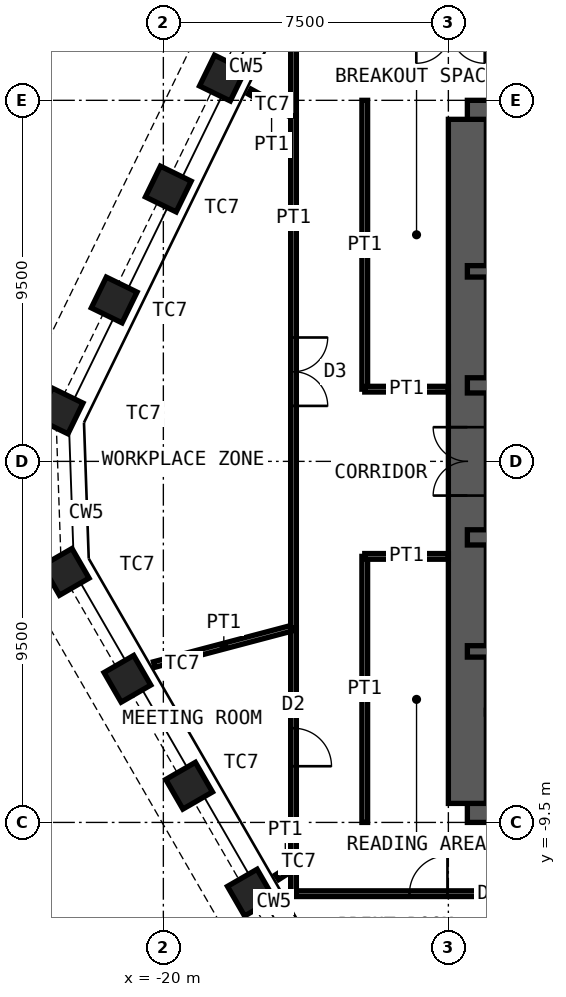
"""IFC4 building model, lengths in metres.
Left out: names, types, materials, properties, quantities, classifications, styles, units other than length and angle.
Written with IfcOpenShell. Run it as: python <this file> out.ifc"""

import sys

from ifc_helpers import new_model, si_unit, direction, frame, frame_2d, origin, origin_2d, place, context, subcontext, project, spatial, rectangle, hollow_rectangle, extrude, element, fill, save


model = new_model("IFC4")
c1 = context("Model", 3, precision=1e-05, world=origin(), true_north=direction((0.0, 1.0)))
c2 = subcontext(c1, "Body", "Model", "MODEL_VIEW")
j1 = project(units=[si_unit("LENGTHUNIT", "METRE"), si_unit("PLANEANGLEUNIT", "RADIAN")], contexts=[c1])
p1 = place(None, origin())
s1 = spatial("IfcSite", under=j1, at=p1, CompositionType="ELEMENT")
p2 = place(p1, origin())
s2 = spatial("IfcBuilding", under=s1, at=p2, CompositionType="ELEMENT")
p3 = place(p2, frame((0.0, 0.0, 299.8)))
s3 = spatial("IfcBuildingStorey", under=s2, at=p3, CompositionType="ELEMENT", Elevation=299.8)
for number, where, z_axis, x_axis in (
    (1, (-17.698, -11.347, 0.0), (0.0, 0.0, 1.0), (0.5, -0.866, 0.0)),
    (2, (-19.322, -8.534, 0.0), (0.0, 0.0, 1.0), (0.5, -0.866, 0.0)),
    (3, (-20.946, -5.721, 0.0), (0.0, 0.0, 1.0), (0.5, -0.866, 0.0)),
    (4, (-22.57, -2.908, 0.0), (0.0, 0.0, 1.0), (0.5, -0.866, 0.0)),
    (5, (-22.717, 1.327, 0.0), (0.0, 0.0, 1.0), (-0.438, -0.899, 0.0)),
    (6, (-21.293, 4.246, 0.0), (0.0, 0.0, 1.0), (-0.438, -0.899, 0.0)),
    (7, (-19.87, 7.166, 0.0), (0.0, 0.0, 1.0), (-0.438, -0.899, 0.0)),
    (8, (-18.446, 10.085, 0.0), (0.0, 0.0, 1.0), (-0.438, -0.899, 0.0)),
):
    element("IfcColumn", number, at=place(p3, frame(where, z_axis=z_axis, x_axis=x_axis)), inside=s3, PredefinedType="COLUMN", context=c2, shape_type="SweptSolid", body=[
        extrude(hollow_rectangle(XDim=0.9, YDim=0.9, WallThickness=0.06, at=origin_2d()), origin(), (0.0, 0.0, 1.0), 4.2),
    ])
p4 = place(p3, frame((-12.0, 9.0, 0.0), z_axis=(0.0, 0.0, 1.0), x_axis=(1.0, 0.0, 0.0)))
e9 = element("IfcWall", 9, at=p4, inside=s3, PredefinedType="SHEAR", context=c2, shape_type="SweptSolid", body=[
    extrude(rectangle(XDim=24.0, YDim=1.0, at=frame_2d((12.0, 0.0))), origin(), (0.0, 0.0, 1.0), 4.2),
])
p5 = place(p4, frame((10.4, 0.0, 0.0)))
e10 = element("IfcOpeningElement", 10, at=p5, cuts=e9, PredefinedType="OPENING", context=c2, shape_type="SweptSolid", body=[
    extrude(rectangle(XDim=1.0, YDim=2.1, at=frame_2d((0.5, 1.05))), frame((0.0, 0.51, 0.0), z_axis=(0.0, -1.0, 0.0), x_axis=(1.0, 0.0, 0.0)), (0.0, 0.0, 1.0), 1.02),
])
p6 = place(p4, frame((17.6, 0.0, 0.0)))
e11 = element("IfcOpeningElement", 11, at=p6, cuts=e9, PredefinedType="OPENING", context=c2, shape_type="SweptSolid", body=[
    extrude(rectangle(XDim=0.9, YDim=2.1, at=frame_2d((0.45, 1.05))), frame((0.0, 0.51, 0.0), z_axis=(0.0, -1.0, 0.0), x_axis=(1.0, 0.0, 0.0)), (0.0, 0.0, 1.0), 1.02),
])
p7 = place(p4, frame((21.9, 0.0, 0.0)))
e12 = element("IfcOpeningElement", 12, at=p7, cuts=e9, PredefinedType="OPENING", context=c2, shape_type="SweptSolid", body=[
    extrude(rectangle(XDim=0.9, YDim=2.1, at=frame_2d((0.45, 1.05))), frame((0.0, 0.51, 0.0), z_axis=(0.0, -1.0, 0.0), x_axis=(1.0, 0.0, 0.0)), (0.0, 0.0, 1.0), 1.02),
])
p8 = place(p3, frame((-12.0, -9.0, 0.0), z_axis=(0.0, 0.0, 1.0), x_axis=(1.0, 0.0, 0.0)))
e13 = element("IfcWall", 13, at=p8, inside=s3, PredefinedType="SHEAR", context=c2, shape_type="SweptSolid", body=[
    extrude(rectangle(XDim=24.0, YDim=1.0, at=frame_2d((12.0, 0.0))), origin(), (0.0, 0.0, 1.0), 4.2),
])
p9 = place(p8, frame((1.35, 0.0, 0.0)))
e14 = element("IfcOpeningElement", 14, at=p9, cuts=e13, PredefinedType="OPENING", context=c2, shape_type="SweptSolid", body=[
    extrude(rectangle(XDim=1.0, YDim=2.1, at=frame_2d((0.5, 1.05))), frame((0.0, 0.51, 0.0), z_axis=(0.0, -1.0, 0.0), x_axis=(1.0, 0.0, 0.0)), (0.0, 0.0, 1.0), 1.02),
])
p10 = place(p8, frame((5.325, 0.0, 0.0)))
e15 = element("IfcOpeningElement", 15, at=p10, cuts=e13, PredefinedType="OPENING", context=c2, shape_type="SweptSolid", body=[
    extrude(rectangle(XDim=1.15, YDim=2.1, at=frame_2d((0.575, 1.05))), frame((0.0, 0.51, 0.0), z_axis=(0.0, -1.0, 0.0), x_axis=(1.0, 0.0, 0.0)), (0.0, 0.0, 1.0), 1.02),
])
p11 = place(p8, frame((12.6, 0.0, 0.0)))
e16 = element("IfcOpeningElement", 16, at=p11, cuts=e13, PredefinedType="OPENING", context=c2, shape_type="SweptSolid", body=[
    extrude(rectangle(XDim=1.0, YDim=2.1, at=frame_2d((0.5, 1.05))), frame((0.0, 0.51, 0.0), z_axis=(0.0, -1.0, 0.0), x_axis=(1.0, 0.0, 0.0)), (0.0, 0.0, 1.0), 1.02),
])
p12 = place(p3, frame((-12.0, -9.0, 0.0), z_axis=(0.0, 0.0, 1.0), x_axis=(0.0, 1.0, 0.0)))
e17 = element("IfcWall", 17, at=p12, inside=s3, PredefinedType="SHEAR", context=c2, shape_type="SweptSolid", body=[
    extrude(rectangle(XDim=18.0, YDim=1.0, at=frame_2d((9.0, 0.0))), origin(), (0.0, 0.0, 1.0), 4.2),
])
p13 = place(p12, frame((8.1, 0.0, 0.0)))
e18 = element("IfcOpeningElement", 18, at=p13, cuts=e17, PredefinedType="OPENING", context=c2, shape_type="SweptSolid", body=[
    extrude(rectangle(XDim=1.8, YDim=2.1, at=frame_2d((0.9, 1.05))), frame((0.0, 0.51, 0.0), z_axis=(0.0, -1.0, 0.0), x_axis=(1.0, 0.0, 0.0)), (0.0, 0.0, 1.0), 1.02),
])
p14 = place(p3, frame((-12.0, 5.0, 0.0), z_axis=(0.0, 0.0, 1.0), x_axis=(1.0, 0.0, 0.0)))
e19 = element("IfcWall", 19, at=p14, inside=s3, PredefinedType="SHEAR", context=c2, shape_type="SweptSolid", body=[
    extrude(rectangle(XDim=24.0, YDim=0.3, at=frame_2d((12.0, 0.0))), origin(), (0.0, 0.0, 1.0), 4.2),
])
p15 = place(p3, frame((-12.0, 2.0, 0.0), z_axis=(0.0, 0.0, 1.0), x_axis=(1.0, 0.0, 0.0)))
e20 = element("IfcWall", 20, at=p15, inside=s3, PredefinedType="SHEAR", context=c2, shape_type="SweptSolid", body=[
    extrude(rectangle(XDim=24.0, YDim=0.4, at=frame_2d((12.0, 0.0))), origin(), (0.0, 0.0, 1.0), 4.2),
])
p16 = place(p15, frame((2.4, 0.0, 0.0)))
e21 = element("IfcOpeningElement", 21, at=p16, cuts=e20, PredefinedType="OPENING", context=c2, shape_type="SweptSolid", body=[
    extrude(rectangle(XDim=1.1, YDim=2.1, at=frame_2d((0.55, 1.05))), frame((0.0, 0.21, 0.0), z_axis=(0.0, -1.0, 0.0), x_axis=(1.0, 0.0, 0.0)), (0.0, 0.0, 1.0), 0.42),
])
p17 = place(p15, frame((22.0, 0.0, 0.0)))
e22 = element("IfcOpeningElement", 22, at=p17, cuts=e20, PredefinedType="OPENING", context=c2, shape_type="SweptSolid", body=[
    extrude(rectangle(XDim=1.1, YDim=2.1, at=frame_2d((0.55, 1.05))), frame((0.0, 0.21, 0.0), z_axis=(0.0, -1.0, 0.0), x_axis=(1.0, 0.0, 0.0)), (0.0, 0.0, 1.0), 0.42),
])
p18 = place(p15, frame((10.15, 0.0, 0.0)))
e23 = element("IfcOpeningElement", 23, at=p18, cuts=e20, PredefinedType="OPENING", context=c2, shape_type="SweptSolid", body=[
    extrude(rectangle(XDim=1.0, YDim=2.1, at=frame_2d((0.5, 1.05))), frame((0.0, 0.21, 0.0), z_axis=(0.0, -1.0, 0.0), x_axis=(1.0, 0.0, 0.0)), (0.0, 0.0, 1.0), 0.42),
])
p19 = place(p15, frame((6.9, 0.0, 0.0)))
e24 = element("IfcOpeningElement", 24, at=p19, cuts=e20, PredefinedType="OPENING", context=c2, shape_type="SweptSolid", body=[
    extrude(rectangle(XDim=1.0, YDim=2.1, at=frame_2d((0.5, 1.05))), frame((0.0, 0.21, 0.0), z_axis=(0.0, -1.0, 0.0), x_axis=(1.0, 0.0, 0.0)), (0.0, 0.0, 1.0), 0.42),
])
p20 = place(p15, frame((13.35, 0.0, 0.0)))
e25 = element("IfcOpeningElement", 25, at=p20, cuts=e20, PredefinedType="OPENING", context=c2, shape_type="SweptSolid", body=[
    extrude(rectangle(XDim=1.1, YDim=2.4, at=frame_2d((0.55, 1.2))), frame((0.0, 0.21, 0.0), z_axis=(0.0, -1.0, 0.0), x_axis=(1.0, 0.0, 0.0)), (0.0, 0.0, 1.0), 0.42),
])
p21 = place(p15, frame((16.15, 0.0, 0.0)))
e26 = element("IfcOpeningElement", 26, at=p21, cuts=e20, PredefinedType="OPENING", context=c2, shape_type="SweptSolid", body=[
    extrude(rectangle(XDim=1.1, YDim=2.4, at=frame_2d((0.55, 1.2))), frame((0.0, 0.21, 0.0), z_axis=(0.0, -1.0, 0.0), x_axis=(1.0, 0.0, 0.0)), (0.0, 0.0, 1.0), 0.42),
])
p22 = place(p15, frame((19.0, 0.0, 0.0)))
e27 = element("IfcOpeningElement", 27, at=p22, cuts=e20, PredefinedType="OPENING", context=c2, shape_type="SweptSolid", body=[
    extrude(rectangle(XDim=1.0, YDim=2.1, at=frame_2d((0.5, 1.05))), frame((0.0, 0.21, 0.0), z_axis=(0.0, -1.0, 0.0), x_axis=(1.0, 0.0, 0.0)), (0.0, 0.0, 1.0), 0.42),
])
p23 = place(p3, frame((-12.0, -2.0, 0.0), z_axis=(0.0, 0.0, 1.0), x_axis=(1.0, 0.0, 0.0)))
e28 = element("IfcWall", 28, at=p23, inside=s3, PredefinedType="SHEAR", context=c2, shape_type="SweptSolid", body=[
    extrude(rectangle(XDim=24.0, YDim=0.4, at=frame_2d((12.0, 0.0))), origin(), (0.0, 0.0, 1.0), 4.2),
])
p24 = place(p23, frame((1.1, 0.0, 0.0)))
e29 = element("IfcOpeningElement", 29, at=p24, cuts=e28, PredefinedType="OPENING", context=c2, shape_type="SweptSolid", body=[
    extrude(rectangle(XDim=1.1, YDim=2.1, at=frame_2d((0.55, 1.05))), frame((0.0, 0.21, 0.0), z_axis=(0.0, -1.0, 0.0), x_axis=(1.0, 0.0, 0.0)), (0.0, 0.0, 1.0), 0.42),
])
p25 = place(p23, frame((13.55, 0.0, 0.0)))
e30 = element("IfcOpeningElement", 30, at=p25, cuts=e28, PredefinedType="OPENING", context=c2, shape_type="SweptSolid", body=[
    extrude(rectangle(XDim=1.1, YDim=2.1, at=frame_2d((0.55, 1.05))), frame((0.0, 0.21, 0.0), z_axis=(0.0, -1.0, 0.0), x_axis=(1.0, 0.0, 0.0)), (0.0, 0.0, 1.0), 0.42),
])
p26 = place(p23, frame((20.7, 0.0, 0.0)))
e31 = element("IfcOpeningElement", 31, at=p26, cuts=e28, PredefinedType="OPENING", context=c2, shape_type="SweptSolid", body=[
    extrude(rectangle(XDim=1.1, YDim=2.1, at=frame_2d((0.55, 1.05))), frame((0.0, 0.21, 0.0), z_axis=(0.0, -1.0, 0.0), x_axis=(1.0, 0.0, 0.0)), (0.0, 0.0, 1.0), 0.42),
])
p27 = place(p23, frame((4.0, 0.0, 0.0)))
e32 = element("IfcOpeningElement", 32, at=p27, cuts=e28, PredefinedType="OPENING", context=c2, shape_type="SweptSolid", body=[
    extrude(rectangle(XDim=1.0, YDim=2.1, at=frame_2d((0.5, 1.05))), frame((0.0, 0.21, 0.0), z_axis=(0.0, -1.0, 0.0), x_axis=(1.0, 0.0, 0.0)), (0.0, 0.0, 1.0), 0.42),
])
p28 = place(p23, frame((6.8, 0.0, 0.0)))
e33 = element("IfcOpeningElement", 33, at=p28, cuts=e28, PredefinedType="OPENING", context=c2, shape_type="SweptSolid", body=[
    extrude(rectangle(XDim=1.0, YDim=2.1, at=frame_2d((0.5, 1.05))), frame((0.0, 0.21, 0.0), z_axis=(0.0, -1.0, 0.0), x_axis=(1.0, 0.0, 0.0)), (0.0, 0.0, 1.0), 0.42),
])
p29 = place(p23, frame((9.6, 0.0, 0.0)))
e34 = element("IfcOpeningElement", 34, at=p29, cuts=e28, PredefinedType="OPENING", context=c2, shape_type="SweptSolid", body=[
    extrude(rectangle(XDim=1.0, YDim=2.1, at=frame_2d((0.5, 1.05))), frame((0.0, 0.21, 0.0), z_axis=(0.0, -1.0, 0.0), x_axis=(1.0, 0.0, 0.0)), (0.0, 0.0, 1.0), 0.42),
])
p30 = place(p3, frame((-12.0, -5.0, 0.0), z_axis=(0.0, 0.0, 1.0), x_axis=(1.0, 0.0, 0.0)))
e35 = element("IfcWall", 35, at=p30, inside=s3, PredefinedType="SHEAR", context=c2, shape_type="SweptSolid", body=[
    extrude(rectangle(XDim=24.0, YDim=0.3, at=frame_2d((12.0, 0.0))), origin(), (0.0, 0.0, 1.0), 4.2),
])
p31 = place(p3, frame((-17.729, 9.73, 0.0), z_axis=(0.0, 0.0, 1.0), x_axis=(0.87667364743, -0.481085559855, 0.0)))
e36 = element("IfcWall", 36, at=p31, inside=s3, PredefinedType="PARTITIONING", context=c2, shape_type="SweptSolid", body=[
    extrude(rectangle(XDim=1.316, YDim=0.15, at=frame_2d((0.658, 0.0))), origin(), (0.0, 0.0, 1.0), 2.93),
])
p32 = place(p3, frame((-16.575, 9.097, 0.0), z_axis=(0.0, 0.0, 1.0), x_axis=(0.0, 1.0, 0.0)))
e37 = element("IfcWall", 37, at=p32, inside=s3, PredefinedType="PARTITIONING", context=c2, shape_type="SweptSolid", body=[
    extrude(rectangle(XDim=2.278, YDim=0.15, at=frame_2d((1.139, 0.0))), origin(), (0.0, 0.0, 1.0), 4.03),
])
p33 = place(p3, frame((-13.779, -16.546, 0.0), z_axis=(0.0, 0.0, 1.0), x_axis=(0.63993100432, 0.768432371592, 0.0)))
e38 = element("IfcWall", 38, at=p33, inside=s3, PredefinedType="PARTITIONING", context=c2, shape_type="SweptSolid", body=[
    extrude(rectangle(XDim=6.729, YDim=0.15, at=frame_2d((3.365, 0.0))), origin(), (0.0, 0.0, 1.0), 2.93),
])
p34 = place(p3, frame((-9.473, -11.375, 0.0), z_axis=(0.0, 0.0, 1.0), x_axis=(-1.0, 0.0, 0.0)))
e39 = element("IfcWall", 39, at=p34, inside=s3, PredefinedType="PARTITIONING", context=c2, shape_type="SweptSolid", body=[
    extrude(rectangle(XDim=7.102, YDim=0.15, at=frame_2d((3.551, 0.0))), origin(), (0.0, 0.0, 1.0), 4.03),
])
p35 = place(p34, frame((3.051, 0.0, 0.0)))
e40 = element("IfcOpeningElement", 40, at=p35, cuts=e39, PredefinedType="OPENING", context=c2, shape_type="SweptSolid", body=[
    extrude(rectangle(XDim=1.0, YDim=2.4, at=frame_2d((0.5, 1.2))), frame((0.0, 0.085, 0.0), z_axis=(0.0, -1.0, 0.0), x_axis=(1.0, 0.0, 0.0)), (0.0, 0.0, 1.0), 0.17),
])
p36 = place(p3, frame((-16.575, -11.375, 0.0), z_axis=(0.0, 0.0, 1.0), x_axis=(0.0, 1.0, 0.0)))
e41 = element("IfcWall", 41, at=p36, inside=s3, PredefinedType="PARTITIONING", context=c2, shape_type="SweptSolid", body=[
    extrude(rectangle(XDim=0.71, YDim=0.15, at=frame_2d((0.355, 0.0))), origin(), (0.0, 0.0, 1.0), 4.03),
])
p37 = place(p3, frame((-17.007, -10.943, 0.0), z_axis=(0.0, 0.0, 1.0), x_axis=(0.840931402951, 0.541141733311, 0.0)))
e42 = element("IfcWall", 42, at=p37, inside=s3, PredefinedType="PARTITIONING", context=c2, shape_type="SweptSolid", body=[
    extrude(rectangle(XDim=0.514, YDim=0.15, at=frame_2d((0.257, 0.0))), origin(), (0.0, 0.0, 1.0), 2.93),
])
p38 = place(p3, frame((-16.575, -10.665, 0.0), z_axis=(0.0, 0.0, 1.0), x_axis=(0.0, 1.0, 0.0)))
e43 = element("IfcWall", 43, at=p38, inside=s3, PredefinedType="PARTITIONING", context=c2, shape_type="SweptSolid", body=[
    extrude(rectangle(XDim=6.288, YDim=0.15, at=frame_2d((3.144, 0.0))), origin(), (0.0, 0.0, 1.0), 4.03),
])
p39 = place(p38, frame((2.644, 0.0, 0.0)))
e44 = element("IfcOpeningElement", 44, at=p39, cuts=e43, PredefinedType="OPENING", context=c2, shape_type="SweptSolid", body=[
    extrude(rectangle(XDim=1.0, YDim=2.4, at=frame_2d((0.5, 1.2))), frame((0.0, 0.085, 0.0), z_axis=(0.0, -1.0, 0.0), x_axis=(1.0, 0.0, 0.0)), (0.0, 0.0, 1.0), 0.17),
])
p40 = place(p3, frame((-20.243, -5.346, 0.0), z_axis=(0.0, 0.0, 1.0), x_axis=(0.966843218991, 0.255370691137, 0.0)))
e45 = element("IfcWall", 45, at=p40, inside=s3, PredefinedType="PARTITIONING", context=c2, shape_type="SweptSolid", body=[
    extrude(rectangle(XDim=3.793, YDim=0.15, at=frame_2d((1.897, 0.0))), origin(), (0.0, 0.0, 1.0), 2.93),
])
p41 = place(p3, frame((-16.575, -4.377, 0.0), z_axis=(0.0, 0.0, 1.0), x_axis=(0.0, 1.0, 0.0)))
e46 = element("IfcWall", 46, at=p41, inside=s3, PredefinedType="PARTITIONING", context=c2, shape_type="SweptSolid", body=[
    extrude(rectangle(XDim=13.474, YDim=0.15, at=frame_2d((6.737, 0.0))), origin(), (0.0, 0.0, 1.0), 4.03),
])
p42 = place(p41, frame((5.837, 0.0, 0.0)))
e47 = element("IfcOpeningElement", 47, at=p42, cuts=e46, PredefinedType="OPENING", context=c2, shape_type="SweptSolid", body=[
    extrude(rectangle(XDim=1.8, YDim=2.4, at=frame_2d((0.9, 1.2))), frame((0.0, 0.085, 0.0), z_axis=(0.0, -1.0, 0.0), x_axis=(1.0, 0.0, 0.0)), (0.0, 0.0, 1.0), 0.17),
])
p43 = place(p3, frame((-14.7, 1.9, 0.0), z_axis=(0.0, 0.0, 1.0), x_axis=(0.0, 1.0, 0.0)))
e48 = element("IfcWall", 48, at=p43, inside=s3, PredefinedType="PARTITIONING", context=c2, shape_type="SweptSolid", body=[
    extrude(rectangle(XDim=7.6, YDim=0.15, at=frame_2d((3.8, 0.0))), origin(), (0.0, 0.0, 1.0), 4.03),
])
p44 = place(p3, frame((-12.5, 1.9, 0.0), z_axis=(0.0, 0.0, 1.0), x_axis=(-1.0, 0.0, 0.0)))
e49 = element("IfcWall", 49, at=p44, inside=s3, PredefinedType="PARTITIONING", context=c2, shape_type="SweptSolid", body=[
    extrude(rectangle(XDim=2.2, YDim=0.15, at=frame_2d((1.1, 0.0))), origin(), (0.0, 0.0, 1.0), 3.13),
])
p45 = place(p3, frame((-14.7, -9.5, 0.0), z_axis=(0.0, 0.0, 1.0), x_axis=(0.0, 1.0, 0.0)))
e50 = element("IfcWall", 50, at=p45, inside=s3, PredefinedType="PARTITIONING", context=c2, shape_type="SweptSolid", body=[
    extrude(rectangle(XDim=7.0, YDim=0.15, at=frame_2d((3.5, 0.0))), origin(), (0.0, 0.0, 1.0), 4.03),
])
p46 = place(p3, frame((-12.5, -2.5, 0.0), z_axis=(0.0, 0.0, 1.0), x_axis=(-1.0, 0.0, 0.0)))
e51 = element("IfcWall", 51, at=p46, inside=s3, PredefinedType="PARTITIONING", context=c2, shape_type="SweptSolid", body=[
    extrude(rectangle(XDim=2.2, YDim=0.15, at=frame_2d((1.1, 0.0))), origin(), (0.0, 0.0, 1.0), 3.13),
])
p47 = place(p13, origin())
e52 = element("IfcDoor", 52, at=p47, inside=s3, OperationType="DOUBLE_DOOR_DOUBLE_SWING", PredefinedType="DOOR", context=c2, shape_type="SweptSolid", body=[
    extrude(rectangle(XDim=1.8, YDim=2.1, at=frame_2d((0.9, 1.05))), frame((0.0, 0.025, 0.0), z_axis=(0.0, -1.0, 0.0), x_axis=(1.0, 0.0, 0.0)), (0.0, 0.0, 1.0), 0.05),
])
fill(e18, e52)
p48 = place(p35, origin())
e53 = element("IfcDoor", 53, at=p48, inside=s3, OperationType="SINGLE_SWING_LEFT", PredefinedType="DOOR", context=c2, shape_type="SweptSolid", body=[
    extrude(rectangle(XDim=1.0, YDim=2.4, at=frame_2d((0.5, 1.2))), frame((0.0, 0.025, 0.0), z_axis=(0.0, -1.0, 0.0), x_axis=(1.0, 0.0, 0.0)), (0.0, 0.0, 1.0), 0.05),
])
fill(e40, e53)
p49 = place(p39, origin())
e54 = element("IfcDoor", 54, at=p49, inside=s3, OperationType="SINGLE_SWING_LEFT", PredefinedType="DOOR", context=c2, shape_type="SweptSolid", body=[
    extrude(rectangle(XDim=1.0, YDim=2.4, at=frame_2d((0.5, 1.2))), frame((0.0, 0.025, 0.0), z_axis=(0.0, -1.0, 0.0), x_axis=(1.0, 0.0, 0.0)), (0.0, 0.0, 1.0), 0.05),
])
fill(e44, e54)
p50 = place(p42, origin())
e55 = element("IfcDoor", 55, at=p50, inside=s3, OperationType="DOUBLE_DOOR_DOUBLE_SWING", PredefinedType="DOOR", context=c2, shape_type="SweptSolid", body=[
    extrude(rectangle(XDim=1.8, YDim=2.4, at=frame_2d((0.9, 1.2))), frame((0.0, 0.025, 0.0), z_axis=(0.0, -1.0, 0.0), x_axis=(1.0, 0.0, 0.0)), (0.0, 0.0, 1.0), 0.05),
])
fill(e47, e55)
save(model, sys.argv[1])
